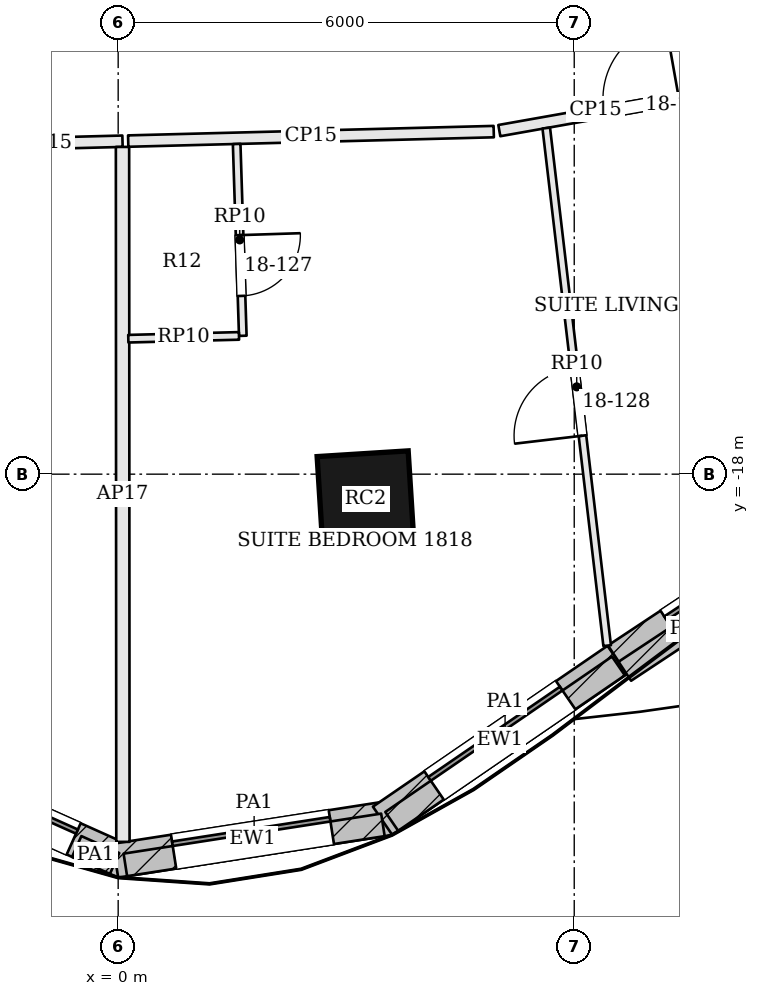
"""IFC4 building model, lengths in metres.
Left out: names, types, materials, properties, quantities, classifications, styles, units other than length and angle.
Written with IfcOpenShell. Run it as: python <this file> out.ifc"""

import sys

from ifc_helpers import new_model, si_unit, direction, frame, frame_2d, origin, origin_2d, place, context, subcontext, project, spatial, rectangle, extrude, element, fill, save


model = new_model("IFC4")
c1 = context("Model", 3, precision=1e-05, world=origin(), true_north=direction((0.0, 1.0)))
c2 = subcontext(c1, "Body", "Model", "MODEL_VIEW")
j1 = project(units=[si_unit("LENGTHUNIT", "METRE"), si_unit("PLANEANGLEUNIT", "RADIAN")], contexts=[c1])
p1 = place(None, origin())
s1 = spatial("IfcSite", under=j1, at=p1, CompositionType="ELEMENT")
p2 = place(p1, origin())
s2 = spatial("IfcBuilding", under=s1, at=p2, CompositionType="ELEMENT")
p3 = place(p2, frame((0.0, 0.0, 81.6)))
s3 = spatial("IfcBuildingStorey", under=s2, at=p3, CompositionType="ELEMENT", Elevation=81.6)
p4 = place(p3, frame((3.254, -18.33, -0.7), z_axis=(0.0, 0.0, 1.0), x_axis=(0.998031548759, 0.062713855578, 0.0)))
e1 = element("IfcColumn", 1, at=p4, inside=s3, PredefinedType="COLUMN", context=c2, shape_type="SweptSolid", body=[
    extrude(rectangle(XDim=1.2, YDim=1.2, at=origin_2d()), origin(), (0.0, 0.0, 1.0), 4.3),
])
p5 = place(p3, frame((-3.179, -21.636, 0.0), z_axis=(0.0, 0.0, 1.0), x_axis=(0.912608353595, -0.40883492139, 0.0)))
e2 = element("IfcWall", 2, at=p5, inside=s3, PredefinedType="SOLIDWALL", context=c2, shape_type="SweptSolid", body=[
    extrude(rectangle(XDim=3.585, YDim=0.45, at=frame_2d((1.792, 0.0))), origin(), (0.0, 0.0, 1.0), 3.4),
])
p6 = place(p5, frame((0.742, 0.0, 0.9)))
e3 = element("IfcOpeningElement", 3, at=p6, cuts=e2, PredefinedType="OPENING", context=c2, shape_type="SweptSolid", body=[
    extrude(rectangle(XDim=2.1, YDim=2.0, at=frame_2d((1.05, 1.0))), frame((0.0, 0.235, 0.0), z_axis=(0.0, -1.0, 0.0), x_axis=(1.0, 0.0, 0.0)), (0.0, 0.0, 1.0), 0.47),
])
p7 = place(p3, frame((-0.035, -23.085, 0.0), z_axis=(0.0, 0.0, 1.0), x_axis=(0.988133637562, 0.153596596054, 0.0)))
e4 = element("IfcWall", 4, at=p7, inside=s3, PredefinedType="SOLIDWALL", context=c2, shape_type="SweptSolid", body=[
    extrude(rectangle(XDim=3.646, YDim=0.45, at=frame_2d((1.823, 0.0))), origin(), (0.0, 0.0, 1.0), 3.4),
])
p8 = place(p7, frame((0.773, 0.0, 0.9)))
e5 = element("IfcOpeningElement", 5, at=p8, cuts=e4, PredefinedType="OPENING", context=c2, shape_type="SweptSolid", body=[
    extrude(rectangle(XDim=2.1, YDim=2.0, at=frame_2d((1.05, 1.0))), frame((0.0, 0.235, 0.0), z_axis=(0.0, -1.0, 0.0), x_axis=(1.0, 0.0, 0.0)), (0.0, 0.0, 1.0), 0.47),
])
p9 = place(p3, frame((3.479, -22.56, 0.0), z_axis=(0.0, 0.0, 1.0), x_axis=(0.824722766417, 0.565537230033, 0.0)))
e6 = element("IfcWall", 6, at=p9, inside=s3, PredefinedType="SOLIDWALL", context=c2, shape_type="SweptSolid", body=[
    extrude(rectangle(XDim=3.742, YDim=0.45, at=frame_2d((1.871, 0.0))), origin(), (0.0, 0.0, 1.0), 3.4),
])
p10 = place(p9, frame((0.821, 0.0, 0.9)))
e7 = element("IfcOpeningElement", 7, at=p10, cuts=e6, PredefinedType="OPENING", context=c2, shape_type="SweptSolid", body=[
    extrude(rectangle(XDim=2.1, YDim=2.0, at=frame_2d((1.05, 1.0))), frame((0.0, 0.235, 0.0), z_axis=(0.0, -1.0, 0.0), x_axis=(1.0, 0.0, 0.0)), (0.0, 0.0, 1.0), 0.47),
])
p11 = place(p3, frame((6.568, -20.441, 0.0), z_axis=(0.0, 0.0, 1.0), x_axis=(0.834034214531, 0.551712723246, 0.0)))
e8 = element("IfcWall", 8, at=p11, inside=s3, PredefinedType="SOLIDWALL", context=c2, shape_type="SweptSolid", body=[
    extrude(rectangle(XDim=3.757, YDim=0.45, at=frame_2d((1.879, 0.0))), origin(), (0.0, 0.0, 1.0), 3.4),
])
p12 = place(p11, frame((0.829, 0.0, 0.9)))
e9 = element("IfcOpeningElement", 9, at=p12, cuts=e8, PredefinedType="OPENING", context=c2, shape_type="SweptSolid", body=[
    extrude(rectangle(XDim=2.1, YDim=2.0, at=frame_2d((1.05, 1.0))), frame((0.0, 0.235, 0.0), z_axis=(0.0, -1.0, 0.0), x_axis=(1.0, 0.0, 0.0)), (0.0, 0.0, 1.0), 0.47),
])
p13 = place(p3, frame((-0.545, -22.898, 3.6), z_axis=(0.0, 0.0, 1.0), x_axis=(0.912497815069, -0.409081578044, 0.0)))
e10 = element("IfcWall", 10, at=p13, inside=s3, PredefinedType="PARAPET", context=c2, shape_type="SweptSolid", body=[
    extrude(rectangle(XDim=0.546, YDim=0.3, at=frame_2d((0.273, 0.0))), origin(), (0.0, 0.0, 1.0), 1.1),
])
p14 = place(p3, frame((0.094, -23.14, 3.6), z_axis=(0.0, 0.0, 1.0), x_axis=(0.988150084887, 0.153490748056, 0.0)))
e11 = element("IfcWall", 11, at=p14, inside=s3, PredefinedType="PARAPET", context=c2, shape_type="SweptSolid", body=[
    extrude(rectangle(XDim=3.429, YDim=0.3, at=frame_2d((1.715, 0.0))), origin(), (0.0, 0.0, 1.0), 1.1),
])
p15 = place(p3, frame((3.599, -22.568, 3.6), z_axis=(0.0, 0.0, 1.0), x_axis=(0.82476034254, 0.565482428881, 0.0)))
e12 = element("IfcWall", 12, at=p15, inside=s3, PredefinedType="PARAPET", context=c2, shape_type="SweptSolid", body=[
    extrude(rectangle(XDim=3.616, YDim=0.3, at=frame_2d((1.808, 0.0))), origin(), (0.0, 0.0, 1.0), 1.1),
])
p16 = place(p3, frame((6.665, -20.593, 3.6), z_axis=(0.0, 0.0, 1.0), x_axis=(0.834027642059, 0.551722658843, 0.0)))
e13 = element("IfcWall", 13, at=p16, inside=s3, PredefinedType="PARAPET", context=c2, shape_type="SweptSolid", body=[
    extrude(rectangle(XDim=2.008, YDim=0.3, at=frame_2d((1.004, 0.0))), origin(), (0.0, 0.0, 1.0), 1.1),
])
p17 = place(p3, frame((-1.957, -13.672, 0.0), z_axis=(0.0, 0.0, 1.0), x_axis=(0.999663662109, 0.025933813031, 0.0)))
e14 = element("IfcWall", 14, at=p17, inside=s3, PredefinedType="PARTITIONING", context=c2, shape_type="SweptSolid", body=[
    extrude(rectangle(XDim=2.015, YDim=0.15, at=frame_2d((1.007, 0.0))), origin(), (0.0, 0.0, 1.0), 2.784),
])
p18 = place(p3, frame((0.062, -22.837, 0.0), z_axis=(0.0, 0.0, 1.0), x_axis=(-0.000614184887, 0.999999811388, 0.0)))
e15 = element("IfcWall", 15, at=p18, inside=s3, PredefinedType="PARTITIONING", context=c2, shape_type="SweptSolid", body=[
    extrude(rectangle(XDim=9.143, YDim=0.175, at=frame_2d((4.571, 0.0))), origin(), (0.0, 0.0, 1.0), 2.784),
])
p19 = place(p3, frame((0.132, -13.618, 0.0), z_axis=(0.0, 0.0, 1.0), x_axis=(0.999664963682, 0.025883593008, 0.0)))
e16 = element("IfcWall", 16, at=p19, inside=s3, PredefinedType="PARTITIONING", context=c2, shape_type="SweptSolid", body=[
    extrude(rectangle(XDim=4.811, YDim=0.15, at=frame_2d((2.405, 0.0))), origin(), (0.0, 0.0, 1.0), 2.784),
])
p20 = place(p3, frame((5.015, -13.48, 0.0), z_axis=(0.0, 0.0, 1.0), x_axis=(0.984640294338, 0.174595219768, 0.0)))
e17 = element("IfcWall", 17, at=p20, inside=s3, PredefinedType="PARTITIONING", context=c2, shape_type="SweptSolid", body=[
    extrude(rectangle(XDim=3.181, YDim=0.15, at=frame_2d((1.591, 0.0))), origin(), (0.0, 0.0, 1.0), 2.784),
])
p21 = place(p20, frame((1.4, 0.0, 0.0)))
e18 = element("IfcOpeningElement", 18, at=p21, cuts=e17, PredefinedType="OPENING", context=c2, shape_type="SweptSolid", body=[
    extrude(rectangle(XDim=1.0, YDim=2.1, at=frame_2d((0.5, 1.05))), frame((0.0, 0.085, 0.0), z_axis=(0.0, -1.0, 0.0), x_axis=(1.0, 0.0, 0.0)), (0.0, 0.0, 1.0), 0.17),
])
p22 = place(p3, frame((6.433, -20.256, 0.0), z_axis=(0.0, 0.0, 1.0), x_axis=(-0.116866039573, 0.993147687303, 0.0)))
e19 = element("IfcWall", 19, at=p22, inside=s3, PredefinedType="PARTITIONING", context=c2, shape_type="SweptSolid", body=[
    extrude(rectangle(XDim=6.856, YDim=0.1, at=frame_2d((3.428, 0.0))), origin(), (0.0, 0.0, 1.0), 2.784),
])
p23 = place(p22, frame((2.781, 0.0, 0.0)))
e20 = element("IfcOpeningElement", 20, at=p23, cuts=e19, PredefinedType="OPENING", context=c2, shape_type="SweptSolid", body=[
    extrude(rectangle(XDim=0.9, YDim=2.4, at=frame_2d((0.45, 1.2))), frame((0.0, 0.06, 0.0), z_axis=(0.0, -1.0, 0.0), x_axis=(1.0, 0.0, 0.0)), (0.0, 0.0, 1.0), 0.12),
])
p24 = place(p3, frame((1.559, -13.656, 0.0), z_axis=(0.0, 0.0, 1.0), x_axis=(0.031907900589, -0.999490813304, 0.0)))
e21 = element("IfcWall", 21, at=p24, inside=s3, PredefinedType="PARTITIONING", context=c2, shape_type="SweptSolid", body=[
    extrude(rectangle(XDim=2.525, YDim=0.1, at=frame_2d((1.262, 0.0))), origin(), (0.0, 0.0, 1.0), 2.784),
])
p25 = place(p24, frame((1.2, 0.0, 0.0)))
e22 = element("IfcOpeningElement", 22, at=p25, cuts=e21, PredefinedType="OPENING", context=c2, shape_type="SweptSolid", body=[
    extrude(rectangle(XDim=0.8, YDim=2.1, at=frame_2d((0.4, 1.05))), frame((0.0, 0.06, 0.0), z_axis=(0.0, -1.0, 0.0), x_axis=(1.0, 0.0, 0.0)), (0.0, 0.0, 1.0), 0.12),
])
p26 = place(p3, frame((1.589, -16.181, 0.0), z_axis=(0.0, 0.0, 1.0), x_axis=(-0.999675274808, -0.025482247488, 0.0)))
e23 = element("IfcWall", 23, at=p26, inside=s3, PredefinedType="PARTITIONING", context=c2, shape_type="SweptSolid", body=[
    extrude(rectangle(XDim=1.456, YDim=0.1, at=frame_2d((0.728, 0.0))), origin(), (0.0, 0.0, 1.0), 2.784),
])
p27 = place(p6, origin())
e24 = element("IfcWindow", 24, at=p27, inside=s3, PartitioningType="SINGLE_PANEL", PredefinedType="WINDOW", context=c2, shape_type="SweptSolid", body=[
    extrude(rectangle(XDim=2.1, YDim=2.0, at=frame_2d((1.05, 1.0))), frame((0.0, 0.135, 0.0), z_axis=(0.0, -1.0, 0.0), x_axis=(1.0, 0.0, 0.0)), (0.0, 0.0, 1.0), 0.06),
])
fill(e3, e24)
p28 = place(p8, origin())
e25 = element("IfcWindow", 25, at=p28, inside=s3, PartitioningType="SINGLE_PANEL", PredefinedType="WINDOW", context=c2, shape_type="SweptSolid", body=[
    extrude(rectangle(XDim=2.1, YDim=2.0, at=frame_2d((1.05, 1.0))), frame((0.0, 0.135, 0.0), z_axis=(0.0, -1.0, 0.0), x_axis=(1.0, 0.0, 0.0)), (0.0, 0.0, 1.0), 0.06),
])
fill(e5, e25)
p29 = place(p10, origin())
e26 = element("IfcWindow", 26, at=p29, inside=s3, PartitioningType="SINGLE_PANEL", PredefinedType="WINDOW", context=c2, shape_type="SweptSolid", body=[
    extrude(rectangle(XDim=2.1, YDim=2.0, at=frame_2d((1.05, 1.0))), frame((0.0, 0.135, 0.0), z_axis=(0.0, -1.0, 0.0), x_axis=(1.0, 0.0, 0.0)), (0.0, 0.0, 1.0), 0.06),
])
fill(e7, e26)
p30 = place(p12, origin())
e27 = element("IfcWindow", 27, at=p30, inside=s3, PartitioningType="SINGLE_PANEL", PredefinedType="WINDOW", context=c2, shape_type="SweptSolid", body=[
    extrude(rectangle(XDim=2.1, YDim=2.0, at=frame_2d((1.05, 1.0))), frame((0.0, 0.135, 0.0), z_axis=(0.0, -1.0, 0.0), x_axis=(1.0, 0.0, 0.0)), (0.0, 0.0, 1.0), 0.06),
])
fill(e9, e27)
p31 = place(p25, origin())
e28 = element("IfcDoor", 28, at=p31, inside=s3, OperationType="SINGLE_SWING_LEFT", PredefinedType="DOOR", context=c2, shape_type="SweptSolid", body=[
    extrude(rectangle(XDim=0.8, YDim=2.1, at=frame_2d((0.4, 1.05))), frame((0.0, 0.025, 0.0), z_axis=(0.0, -1.0, 0.0), x_axis=(1.0, 0.0, 0.0)), (0.0, 0.0, 1.0), 0.05),
])
fill(e22, e28)
p32 = place(p23, origin())
e29 = element("IfcDoor", 29, at=p32, inside=s3, OperationType="SINGLE_SWING_LEFT", PredefinedType="DOOR", context=c2, shape_type="SweptSolid", body=[
    extrude(rectangle(XDim=0.9, YDim=2.4, at=frame_2d((0.45, 1.2))), frame((0.0, 0.025, 0.0), z_axis=(0.0, -1.0, 0.0), x_axis=(1.0, 0.0, 0.0)), (0.0, 0.0, 1.0), 0.05),
])
fill(e20, e29)
p33 = place(p21, origin())
e30 = element("IfcDoor", 30, at=p33, inside=s3, OperationType="SINGLE_SWING_RIGHT", PredefinedType="DOOR", context=c2, shape_type="SweptSolid", body=[
    extrude(rectangle(XDim=1.0, YDim=2.1, at=frame_2d((0.5, 1.05))), frame((0.0, 0.025, 0.0), z_axis=(0.0, -1.0, 0.0), x_axis=(1.0, 0.0, 0.0)), (0.0, 0.0, 1.0), 0.05),
])
fill(e18, e30)
save(model, sys.argv[1])
